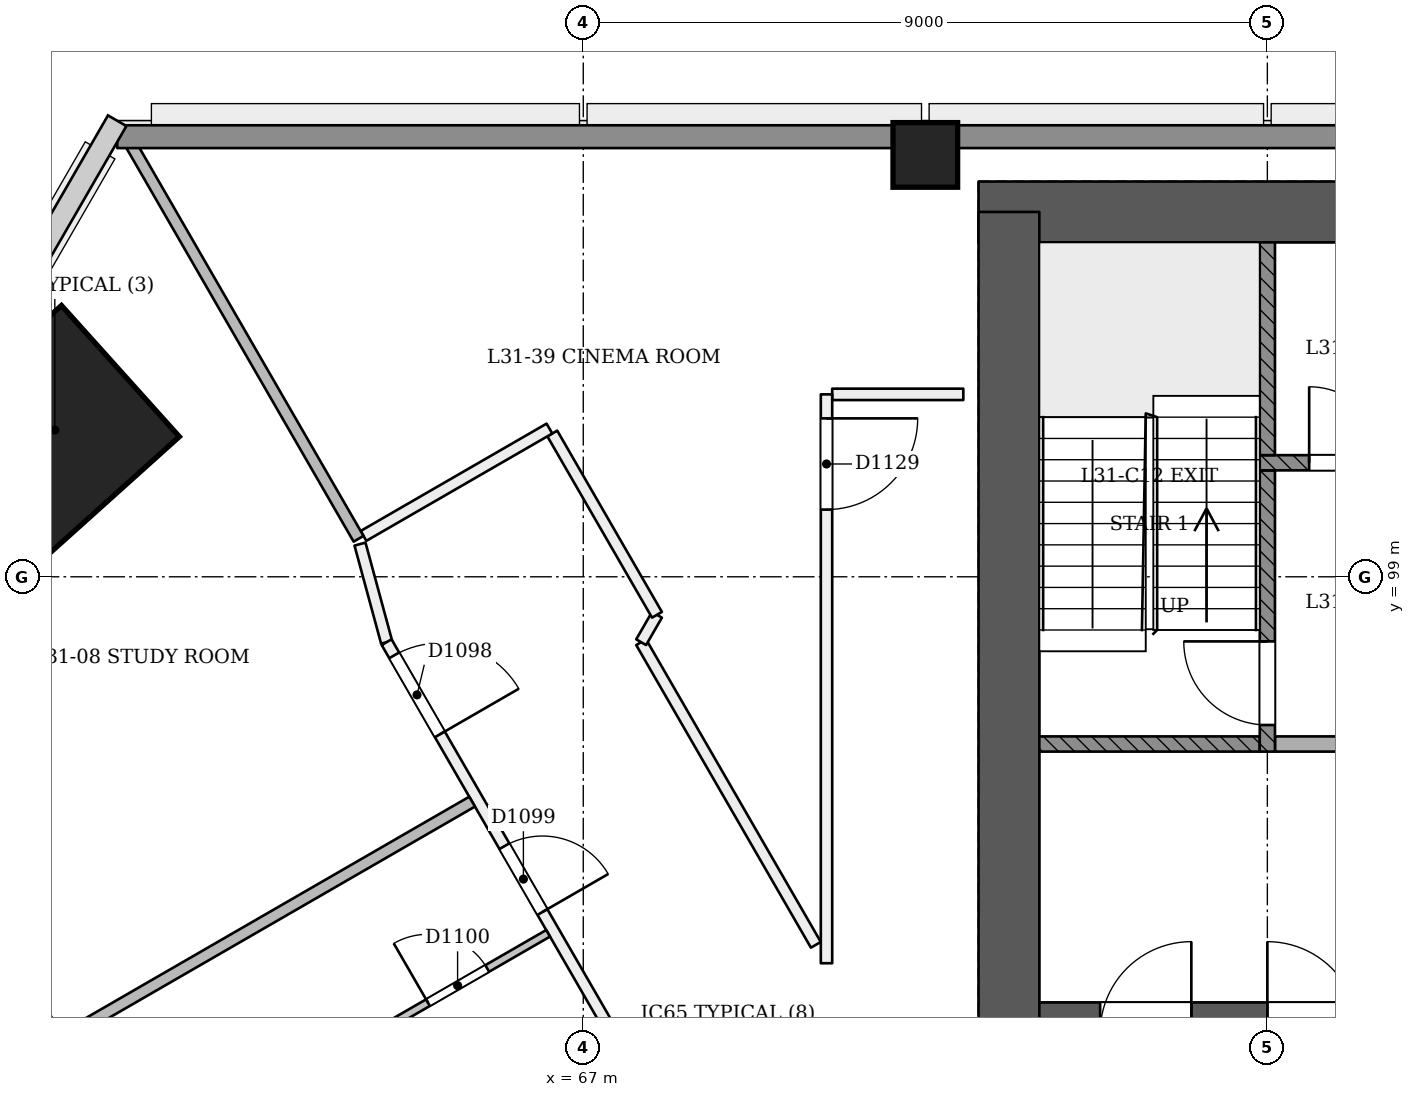
"""IFC4 building model, lengths in metres.
Left out: names, types, materials, properties, quantities, classifications, styles, units other than length and angle.
Written with IfcOpenShell. Run it as: python <this file> out.ifc"""

import sys

from ifc_helpers import new_model, si_unit, direction, frame, frame_2d, origin, origin_2d, place, context, subcontext, project, spatial, rectangle, extrude, element, fill, save


model = new_model("IFC4")
c1 = context("Model", 3, precision=1e-05, world=origin(), true_north=direction((0.0, 1.0)))
c2 = subcontext(c1, "Body", "Model", "MODEL_VIEW")
j1 = project(units=[si_unit("LENGTHUNIT", "METRE"), si_unit("PLANEANGLEUNIT", "RADIAN")], contexts=[c1])
p1 = place(None, origin())
s1 = spatial("IfcSite", under=j1, at=p1, CompositionType="ELEMENT")
p2 = place(p1, origin())
s2 = spatial("IfcBuilding", under=s1, at=p2, CompositionType="ELEMENT")
p3 = place(p2, frame((0.0, 0.0, 124.2)))
s3 = spatial("IfcBuildingStorey", under=s2, at=p3, CompositionType="ELEMENT", Elevation=124.2)
p4 = place(p3, frame((72.6, 93.0, 0.0), z_axis=(0.0, 0.0, 1.0), x_axis=(1.0, 0.0, 0.0)))
e1 = element("IfcWall", 1, at=p4, inside=s3, PredefinedType="SHEAR", context=c2, shape_type="SweptSolid", body=[
    extrude(rectangle(XDim=25.2, YDim=0.8, at=frame_2d((12.6, 0.0))), origin(), (0.0, 0.0, 1.0), 3.6),
])
p5 = place(p4, frame((1.2, 0.0, 0.0)))
e2 = element("IfcOpeningElement", 2, at=p5, cuts=e1, PredefinedType="OPENING", context=c2, shape_type="SweptSolid", body=[
    extrude(rectangle(XDim=1.2, YDim=2.1, at=frame_2d((0.6, 1.05))), frame((0.0, 0.411, 0.0), z_axis=(0.0, -1.0, 0.0), x_axis=(1.0, 0.0, 0.0)), (0.0, 0.0, 1.0), 0.821),
])
p6 = place(p4, frame((3.4, 0.0, 0.0)))
e3 = element("IfcOpeningElement", 3, at=p6, cuts=e1, PredefinedType="OPENING", context=c2, shape_type="SweptSolid", body=[
    extrude(rectangle(XDim=1.2, YDim=2.1, at=frame_2d((0.6, 1.05))), frame((0.0, 0.411, 0.0), z_axis=(0.0, -1.0, 0.0), x_axis=(1.0, 0.0, 0.0)), (0.0, 0.0, 1.0), 0.821),
])
p7 = place(p4, frame((13.4, 0.0, 0.0)))
e4 = element("IfcOpeningElement", 4, at=p7, cuts=e1, PredefinedType="OPENING", context=c2, shape_type="SweptSolid", body=[
    extrude(rectangle(XDim=1.2, YDim=2.1, at=frame_2d((0.6, 1.05))), frame((0.0, 0.411, 0.0), z_axis=(0.0, -1.0, 0.0), x_axis=(1.0, 0.0, 0.0)), (0.0, 0.0, 1.0), 0.821),
])
p8 = place(p4, frame((16.113, 0.0, 0.0)))
e5 = element("IfcOpeningElement", 5, at=p8, cuts=e1, PredefinedType="OPENING", context=c2, shape_type="SweptSolid", body=[
    extrude(rectangle(XDim=1.0, YDim=2.1, at=frame_2d((0.5, 1.05))), frame((0.0, 0.411, 0.0), z_axis=(0.0, -1.0, 0.0), x_axis=(1.0, 0.0, 0.0)), (0.0, 0.0, 1.0), 0.821),
])
p9 = place(p4, frame((20.0, 0.0, 0.0)))
e6 = element("IfcOpeningElement", 6, at=p9, cuts=e1, PredefinedType="OPENING", context=c2, shape_type="SweptSolid", body=[
    extrude(rectangle(XDim=1.0, YDim=2.1, at=frame_2d((0.5, 1.05))), frame((0.0, 0.411, 0.0), z_axis=(0.0, -1.0, 0.0), x_axis=(1.0, 0.0, 0.0)), (0.0, 0.0, 1.0), 0.821),
])
p10 = place(p4, frame((23.137, 0.0, 0.0)))
e7 = element("IfcOpeningElement", 7, at=p10, cuts=e1, PredefinedType="OPENING", context=c2, shape_type="SweptSolid", body=[
    extrude(rectangle(XDim=1.0, YDim=2.1, at=frame_2d((0.5, 1.05))), frame((0.0, 0.411, 0.0), z_axis=(0.0, -1.0, 0.0), x_axis=(1.0, 0.0, 0.0)), (0.0, 0.0, 1.0), 0.821),
])
p11 = place(p3, frame((97.4, 103.8, 0.0), z_axis=(0.0, 0.0, 1.0), x_axis=(-1.0, 0.0, 0.0)))
e8 = element("IfcWall", 8, at=p11, inside=s3, PredefinedType="SHEAR", context=c2, shape_type="SweptSolid", body=[
    extrude(rectangle(XDim=25.2, YDim=0.8, at=frame_2d((12.6, 0.0))), origin(), (0.0, 0.0, 1.0), 3.6),
])
p12 = place(p3, frame((72.6, 103.8, 0.0), z_axis=(0.0, 0.0, 1.0), x_axis=(0.0, -1.0, 0.0)))
e9 = element("IfcWall", 9, at=p12, inside=s3, PredefinedType="SHEAR", context=c2, shape_type="SweptSolid", body=[
    extrude(rectangle(XDim=11.2, YDim=0.8, at=frame_2d((5.6, 0.0))), origin(), (0.0, 0.0, 1.0), 3.6),
])
p13 = place(p3, frame((60.014, 100.92, 0.0), z_axis=(0.028334066552, 0.009286524205, 0.999555371723), x_axis=(-0.86655567717, 0.498682281887, 0.019930882981)))
e10 = element("IfcColumn", 10, at=p13, inside=s3, PredefinedType="COLUMN", context=c2, shape_type="SweptSolid", body=[
    extrude(rectangle(XDim=2.32, YDim=2.32, at=origin_2d()), origin(), (0.0, 0.0, 1.0), 3.602),
])
p14 = place(p3, frame((71.5, 104.55, 0.0), z_axis=(0.0, 0.0, 1.0), x_axis=(1.0, 0.0, 0.0)))
e11 = element("IfcColumn", 11, at=p14, inside=s3, PredefinedType="COLUMN", context=c2, shape_type="SweptSolid", body=[
    extrude(rectangle(XDim=0.85, YDim=0.85, at=origin_2d()), origin(), (0.0, 0.0, 1.0), 3.6),
])
p15 = place(p3, frame((64.062, 99.43, 0.0), z_axis=(0.0, 0.0, 1.0), x_axis=(0.261989498523, -0.965070724177, 0.0)))
e12 = element("IfcWall", 12, at=p15, inside=s3, PredefinedType="PARTITIONING", context=c2, shape_type="SweptSolid", body=[
    extrude(rectangle(XDim=1.337, YDim=0.15, at=frame_2d((0.668, 0.0))), origin(), (0.0, 0.0, 1.0), 3.15),
])
p16 = place(p3, frame((64.413, 98.139, 0.0), z_axis=(0.0, 0.0, 1.0), x_axis=(0.500003831119, -0.866023191876, 0.0)))
e13 = element("IfcWall", 13, at=p16, inside=s3, PredefinedType="PARTITIONING", context=c2, shape_type="SweptSolid", body=[
    extrude(rectangle(XDim=40.758, YDim=0.15, at=frame_2d((20.379, 0.0))), origin(), (0.0, 0.0, 1.0), 2.75),
])
p17 = place(p16, frame((0.2, 0.0, 0.0)))
e14 = element("IfcOpeningElement", 14, at=p17, cuts=e13, PredefinedType="OPENING", context=c2, shape_type="SweptSolid", body=[
    extrude(rectangle(XDim=1.2, YDim=2.1, at=frame_2d((0.6, 1.05))), frame((0.0, 0.085, 0.0), z_axis=(0.0, -1.0, 0.0), x_axis=(1.0, 0.0, 0.0)), (0.0, 0.0, 1.0), 0.171),
])
p18 = place(p16, frame((3.099, 0.0, 0.0)))
e15 = element("IfcOpeningElement", 15, at=p18, cuts=e13, PredefinedType="OPENING", context=c2, shape_type="SweptSolid", body=[
    extrude(rectangle(XDim=1.0, YDim=2.1, at=frame_2d((0.5, 1.05))), frame((0.0, 0.085, 0.0), z_axis=(0.0, -1.0, 0.0), x_axis=(1.0, 0.0, 0.0)), (0.0, 0.0, 1.0), 0.171),
])
p19 = place(p16, frame((9.774, 0.0, 0.0)))
e16 = element("IfcOpeningElement", 16, at=p19, cuts=e13, PredefinedType="OPENING", context=c2, shape_type="SweptSolid", body=[
    extrude(rectangle(XDim=1.0, YDim=2.1, at=frame_2d((0.5, 1.05))), frame((0.0, 0.085, 0.0), z_axis=(0.0, -1.0, 0.0), x_axis=(1.0, 0.0, 0.0)), (0.0, 0.0, 1.0), 0.171),
])
p20 = place(p16, frame((11.984, 0.0, 0.0)))
e17 = element("IfcOpeningElement", 17, at=p20, cuts=e13, PredefinedType="OPENING", context=c2, shape_type="SweptSolid", body=[
    extrude(rectangle(XDim=1.0, YDim=2.1, at=frame_2d((0.5, 1.05))), frame((0.0, 0.085, 0.0), z_axis=(0.0, -1.0, 0.0), x_axis=(1.0, 0.0, 0.0)), (0.0, 0.0, 1.0), 0.171),
])
p21 = place(p16, frame((18.659, 0.0, 0.0)))
e18 = element("IfcOpeningElement", 18, at=p21, cuts=e13, PredefinedType="OPENING", context=c2, shape_type="SweptSolid", body=[
    extrude(rectangle(XDim=1.0, YDim=2.1, at=frame_2d((0.5, 1.05))), frame((0.0, 0.085, 0.0), z_axis=(0.0, -1.0, 0.0), x_axis=(1.0, 0.0, 0.0)), (0.0, 0.0, 1.0), 0.171),
])
p22 = place(p16, frame((22.129, 0.0, 0.0)))
e19 = element("IfcOpeningElement", 19, at=p22, cuts=e13, PredefinedType="OPENING", context=c2, shape_type="SweptSolid", body=[
    extrude(rectangle(XDim=1.0, YDim=2.1, at=frame_2d((0.5, 1.05))), frame((0.0, 0.085, 0.0), z_axis=(0.0, -1.0, 0.0), x_axis=(1.0, 0.0, 0.0)), (0.0, 0.0, 1.0), 0.171),
])
p23 = place(p16, frame((27.659, 0.0, 0.0)))
e20 = element("IfcOpeningElement", 20, at=p23, cuts=e13, PredefinedType="OPENING", context=c2, shape_type="SweptSolid", body=[
    extrude(rectangle(XDim=1.0, YDim=2.1, at=frame_2d((0.5, 1.05))), frame((0.0, 0.085, 0.0), z_axis=(0.0, -1.0, 0.0), x_axis=(1.0, 0.0, 0.0)), (0.0, 0.0, 1.0), 0.171),
])
p24 = place(p16, frame((31.129, 0.0, 0.0)))
e21 = element("IfcOpeningElement", 21, at=p24, cuts=e13, PredefinedType="OPENING", context=c2, shape_type="SweptSolid", body=[
    extrude(rectangle(XDim=1.0, YDim=2.1, at=frame_2d((0.5, 1.05))), frame((0.0, 0.085, 0.0), z_axis=(0.0, -1.0, 0.0), x_axis=(1.0, 0.0, 0.0)), (0.0, 0.0, 1.0), 0.171),
])
p25 = place(p16, frame((36.659, 0.0, 0.0)))
e22 = element("IfcOpeningElement", 22, at=p25, cuts=e13, PredefinedType="OPENING", context=c2, shape_type="SweptSolid", body=[
    extrude(rectangle(XDim=1.0, YDim=2.1, at=frame_2d((0.5, 1.05))), frame((0.0, 0.085, 0.0), z_axis=(0.0, -1.0, 0.0), x_axis=(1.0, 0.0, 0.0)), (0.0, 0.0, 1.0), 0.171),
])
p26 = place(p16, frame((39.445, 0.0, 0.0)))
e23 = element("IfcOpeningElement", 23, at=p26, cuts=e13, PredefinedType="OPENING", context=c2, shape_type="SweptSolid", body=[
    extrude(rectangle(XDim=1.0, YDim=2.1, at=frame_2d((0.5, 1.05))), frame((0.0, 0.085, 0.0), z_axis=(0.0, -1.0, 0.0), x_axis=(1.0, 0.0, 0.0)), (0.0, 0.0, 1.0), 0.171),
])
p27 = place(p3, frame((72.0, 101.4, 0.0), z_axis=(0.0, 0.0, 1.0), x_axis=(-1.0, 0.0, 0.0)))
e24 = element("IfcWall", 24, at=p27, inside=s3, PredefinedType="PARTITIONING", context=c2, shape_type="SweptSolid", body=[
    extrude(rectangle(XDim=1.725, YDim=0.15, at=frame_2d((0.863, 0.0))), origin(), (0.0, 0.0, 1.0), 3.15),
])
p28 = place(p3, frame((70.2, 101.4, 0.0), z_axis=(0.0, 0.0, 1.0), x_axis=(0.0, -1.0, 0.0)))
e25 = element("IfcWall", 25, at=p28, inside=s3, PredefinedType="PARTITIONING", context=c2, shape_type="SweptSolid", body=[
    extrude(rectangle(XDim=7.484, YDim=0.15, at=frame_2d((3.742, 0.0))), origin(), (0.0, 0.0, 1.0), 3.15),
])
p29 = place(p28, frame((0.316, 0.0, 0.0)))
e26 = element("IfcOpeningElement", 26, at=p29, cuts=e25, PredefinedType="OPENING", context=c2, shape_type="SweptSolid", body=[
    extrude(rectangle(XDim=1.2, YDim=2.1, at=frame_2d((0.6, 1.05))), frame((0.0, 0.085, 0.0), z_axis=(0.0, -1.0, 0.0), x_axis=(1.0, 0.0, 0.0)), (0.0, 0.0, 1.0), 0.171),
])
p30 = place(p3, frame((70.06, 94.158, 0.0), z_axis=(0.0, 0.0, 1.0), x_axis=(-0.500005941123, 0.866021973648, 0.0)))
e27 = element("IfcWall", 27, at=p30, inside=s3, PredefinedType="PARTITIONING", context=c2, shape_type="SweptSolid", body=[
    extrude(rectangle(XDim=4.597, YDim=0.15, at=frame_2d((2.299, 0.0))), origin(), (0.0, 0.0, 1.0), 3.15),
])
p31 = place(p3, frame((67.761, 98.139, 0.0), z_axis=(0.0, 0.0, 1.0), x_axis=(0.49967168172, 0.866214875471, 0.0)))
e28 = element("IfcWall", 28, at=p31, inside=s3, PredefinedType="PARTITIONING", context=c2, shape_type="SweptSolid", body=[
    extrude(rectangle(XDim=0.416, YDim=0.15, at=frame_2d((0.208, 0.0))), origin(), (0.0, 0.0, 1.0), 3.15),
])
p32 = place(p3, frame((67.969, 98.5, 0.0), z_axis=(0.0, 0.0, 1.0), x_axis=(-0.499991038717, 0.866030577522, 0.0)))
e29 = element("IfcWall", 29, at=p32, inside=s3, PredefinedType="PARTITIONING", context=c2, shape_type="SweptSolid", body=[
    extrude(rectangle(XDim=2.754, YDim=0.15, at=frame_2d((1.377, 0.0))), origin(), (0.0, 0.0, 1.0), 3.15),
])
p33 = place(p3, frame((66.555, 100.95, 0.0), z_axis=(0.0, 0.0, 1.0), x_axis=(-0.866048868473, -0.499959355765, 0.0)))
e30 = element("IfcWall", 30, at=p33, inside=s3, PredefinedType="PARTITIONING", context=c2, shape_type="SweptSolid", body=[
    extrude(rectangle(XDim=2.825, YDim=0.15, at=frame_2d((1.413, 0.0))), origin(), (0.0, 0.0, 1.0), 3.15),
])
p34 = place(p3, frame((60.042, 92.869, 0.0), z_axis=(0.0, 0.0, 1.0), x_axis=(0.866025401434, 0.500000004071, 0.0)))
e31 = element("IfcWall", 31, at=p34, inside=s3, PredefinedType="PARTITIONING", context=c2, shape_type="SweptSolid", body=[
    extrude(rectangle(XDim=6.345, YDim=0.15, at=frame_2d((3.173, 0.0))), origin(), (0.0, 0.0, 1.0), 2.65),
])
p35 = place(p3, frame((64.044, 99.5, 0.0), z_axis=(0.0, 0.0, 1.0), x_axis=(-0.500004896655, 0.866022576681, 0.0)))
e32 = element("IfcWall", 32, at=p35, inside=s3, PredefinedType="PARTITIONING", context=c2, shape_type="SweptSolid", body=[
    extrude(rectangle(XDim=6.235, YDim=0.15, at=frame_2d((3.118, 0.0))), origin(), (0.0, 0.0, 1.0), 2.65),
])
p36 = place(p3, frame((64.091, 92.897, 0.0), z_axis=(0.0, 0.0, 1.0), x_axis=(0.866048868473, 0.499959355765, 0.0)))
e33 = element("IfcWall", 33, at=p36, inside=s3, PredefinedType="PARTITIONING", context=c2, shape_type="SweptSolid", body=[
    extrude(rectangle(XDim=2.825, YDim=0.1, at=frame_2d((1.413, 0.0))), origin(), (0.0, 0.0, 1.0), 3.15),
])
p37 = place(p36, frame((1.0, 0.0, 0.0)))
e34 = element("IfcOpeningElement", 34, at=p37, cuts=e33, PredefinedType="OPENING", context=c2, shape_type="SweptSolid", body=[
    extrude(rectangle(XDim=0.9, YDim=2.1, at=frame_2d((0.45, 1.05))), frame((0.0, 0.061, 0.0), z_axis=(0.0, -1.0, 0.0), x_axis=(1.0, 0.0, 0.0)), (0.0, 0.0, 1.0), 0.121),
])
p38 = place(p3, frame((60.868, 104.79, 0.0), z_axis=(0.0, 0.0, 1.0), x_axis=(1.0, 0.0, 0.0)))
e35 = element("IfcWall", 35, at=p38, inside=s3, PredefinedType="SOLIDWALL", context=c2, shape_type="SweptSolid", body=[
    extrude(rectangle(XDim=48.264, YDim=0.3, at=frame_2d((24.132, 0.0))), origin(), (0.0, 0.0, 1.0), 2.65),
])
p39 = place(p3, frame((73.0, 96.8, 0.0), z_axis=(0.0, 0.0, 1.0), x_axis=(1.0, 0.0, 0.0)))
e36 = element("IfcWall", 36, at=p39, inside=s3, PredefinedType="SOLIDWALL", context=c2, shape_type="SweptSolid", body=[
    extrude(rectangle(XDim=2.9, YDim=0.2, at=frame_2d((1.45, 0.0))), origin(), (0.0, 0.0, 1.0), 3.15),
])
p40 = place(p3, frame((76.0, 96.7, 0.0), z_axis=(0.0, 0.0, 1.0), x_axis=(0.0, 1.0, 0.0)))
e37 = element("IfcWall", 37, at=p40, inside=s3, PredefinedType="SOLIDWALL", context=c2, shape_type="SweptSolid", body=[
    extrude(rectangle(XDim=3.7, YDim=0.2, at=frame_2d((1.85, 0.0))), origin(), (0.0, 0.0, 1.0), 3.15),
])
p41 = place(p40, frame((0.35, 0.0, 0.0)))
e38 = element("IfcOpeningElement", 38, at=p41, cuts=e37, PredefinedType="OPENING", context=c2, shape_type="SweptSolid", body=[
    extrude(rectangle(XDim=1.1, YDim=2.1, at=frame_2d((0.55, 1.05))), frame((0.0, 0.11, 0.0), z_axis=(0.0, -1.0, 0.0), x_axis=(1.0, 0.0, 0.0)), (0.0, 0.0, 1.0), 0.221),
])
p42 = place(p3, frame((76.1, 96.8, 0.0), z_axis=(0.0, 0.0, 1.0), x_axis=(1.0, 0.0, 0.0)))
e39 = element("IfcWall", 39, at=p42, inside=s3, PredefinedType="PARTITIONING", context=c2, shape_type="SweptSolid", body=[
    extrude(rectangle(XDim=1.9, YDim=0.2, at=frame_2d((0.95, 0.0))), origin(), (0.0, 0.0, 1.0), 3.15),
])
p43 = place(p3, frame((75.9, 100.5, 0.0), z_axis=(0.0, 0.0, 1.0), x_axis=(1.0, 0.0, 0.0)))
e40 = element("IfcWall", 40, at=p43, inside=s3, PredefinedType="SOLIDWALL", context=c2, shape_type="SweptSolid", body=[
    extrude(rectangle(XDim=18.2, YDim=0.2, at=frame_2d((9.1, 0.0))), origin(), (0.0, 0.0, 1.0), 3.15),
])
p44 = place(p43, frame((2.6, 0.0, 0.0)))
e41 = element("IfcOpeningElement", 41, at=p44, cuts=e40, PredefinedType="OPENING", context=c2, shape_type="SweptSolid", body=[
    extrude(rectangle(XDim=1.1, YDim=2.1, at=frame_2d((0.55, 1.05))), frame((0.0, 0.11, 0.0), z_axis=(0.0, -1.0, 0.0), x_axis=(1.0, 0.0, 0.0)), (0.0, 0.0, 1.0), 0.221),
])
p45 = place(p43, frame((4.5, 0.0, 0.0)))
e42 = element("IfcOpeningElement", 42, at=p45, cuts=e40, PredefinedType="OPENING", context=c2, shape_type="SweptSolid", body=[
    extrude(rectangle(XDim=1.1, YDim=2.1, at=frame_2d((0.55, 1.05))), frame((0.0, 0.11, 0.0), z_axis=(0.0, -1.0, 0.0), x_axis=(1.0, 0.0, 0.0)), (0.0, 0.0, 1.0), 0.221),
])
p46 = place(p43, frame((6.4, 0.0, 0.0)))
e43 = element("IfcOpeningElement", 43, at=p46, cuts=e40, PredefinedType="OPENING", context=c2, shape_type="SweptSolid", body=[
    extrude(rectangle(XDim=1.1, YDim=2.1, at=frame_2d((0.55, 1.05))), frame((0.0, 0.11, 0.0), z_axis=(0.0, -1.0, 0.0), x_axis=(1.0, 0.0, 0.0)), (0.0, 0.0, 1.0), 0.221),
])
p47 = place(p43, frame((8.3, 0.0, 0.0)))
e44 = element("IfcOpeningElement", 44, at=p47, cuts=e40, PredefinedType="OPENING", context=c2, shape_type="SweptSolid", body=[
    extrude(rectangle(XDim=1.1, YDim=2.1, at=frame_2d((0.55, 1.05))), frame((0.0, 0.11, 0.0), z_axis=(0.0, -1.0, 0.0), x_axis=(1.0, 0.0, 0.0)), (0.0, 0.0, 1.0), 0.221),
])
p48 = place(p43, frame((10.2, 0.0, 0.0)))
e45 = element("IfcOpeningElement", 45, at=p48, cuts=e40, PredefinedType="OPENING", context=c2, shape_type="SweptSolid", body=[
    extrude(rectangle(XDim=1.1, YDim=2.1, at=frame_2d((0.55, 1.05))), frame((0.0, 0.11, 0.0), z_axis=(0.0, -1.0, 0.0), x_axis=(1.0, 0.0, 0.0)), (0.0, 0.0, 1.0), 0.221),
])
p49 = place(p43, frame((12.1, 0.0, 0.0)))
e46 = element("IfcOpeningElement", 46, at=p49, cuts=e40, PredefinedType="OPENING", context=c2, shape_type="SweptSolid", body=[
    extrude(rectangle(XDim=1.1, YDim=2.1, at=frame_2d((0.55, 1.05))), frame((0.0, 0.11, 0.0), z_axis=(0.0, -1.0, 0.0), x_axis=(1.0, 0.0, 0.0)), (0.0, 0.0, 1.0), 0.221),
])
p50 = place(p43, frame((14.0, 0.0, 0.0)))
e47 = element("IfcOpeningElement", 47, at=p50, cuts=e40, PredefinedType="OPENING", context=c2, shape_type="SweptSolid", body=[
    extrude(rectangle(XDim=1.1, YDim=2.1, at=frame_2d((0.55, 1.05))), frame((0.0, 0.11, 0.0), z_axis=(0.0, -1.0, 0.0), x_axis=(1.0, 0.0, 0.0)), (0.0, 0.0, 1.0), 0.221),
])
p51 = place(p43, frame((0.65, 0.0, 0.0)))
e48 = element("IfcOpeningElement", 48, at=p51, cuts=e40, PredefinedType="OPENING", context=c2, shape_type="SweptSolid", body=[
    extrude(rectangle(XDim=1.0, YDim=2.1, at=frame_2d((0.5, 1.05))), frame((0.0, 0.11, 0.0), z_axis=(0.0, -1.0, 0.0), x_axis=(1.0, 0.0, 0.0)), (0.0, 0.0, 1.0), 0.221),
])
p52 = place(p43, frame((16.3, 0.0, 0.0)))
e49 = element("IfcOpeningElement", 49, at=p52, cuts=e40, PredefinedType="OPENING", context=c2, shape_type="SweptSolid", body=[
    extrude(rectangle(XDim=1.0, YDim=2.1, at=frame_2d((0.5, 1.05))), frame((0.0, 0.11, 0.0), z_axis=(0.0, -1.0, 0.0), x_axis=(1.0, 0.0, 0.0)), (0.0, 0.0, 1.0), 0.221),
])
p53 = place(p3, frame((76.0, 100.6, 0.0), z_axis=(0.0, 0.0, 1.0), x_axis=(0.0, 1.0, 0.0)))
e50 = element("IfcWall", 50, at=p53, inside=s3, PredefinedType="SOLIDWALL", context=c2, shape_type="SweptSolid", body=[
    extrude(rectangle(XDim=2.8, YDim=0.2, at=frame_2d((1.4, 0.0))), origin(), (0.0, 0.0, 1.0), 3.15),
])
p54 = place(p17, origin())
e51 = element("IfcDoor", 51, at=p54, inside=s3, OperationType="SINGLE_SWING_RIGHT", PredefinedType="NOTDEFINED", context=c2, shape_type="SweptSolid", body=[
    extrude(rectangle(XDim=1.2, YDim=2.1, at=frame_2d((0.6, 1.05))), frame((0.0, 0.025, 0.0), z_axis=(0.0, -1.0, 0.0), x_axis=(1.0, 0.0, 0.0)), (0.0, 0.0, 1.0), 0.05),
])
fill(e14, e51)
p55 = place(p18, origin())
e52 = element("IfcDoor", 52, at=p55, inside=s3, OperationType="SINGLE_SWING_RIGHT", PredefinedType="NOTDEFINED", context=c2, shape_type="SweptSolid", body=[
    extrude(rectangle(XDim=1.0, YDim=2.1, at=frame_2d((0.5, 1.05))), frame((0.0, 0.025, 0.0), z_axis=(0.0, -1.0, 0.0), x_axis=(1.0, 0.0, 0.0)), (0.0, 0.0, 1.0), 0.05),
])
fill(e15, e52)
p56 = place(p37, origin())
e53 = element("IfcDoor", 53, at=p56, inside=s3, OperationType="SINGLE_SWING_LEFT", PredefinedType="NOTDEFINED", context=c2, shape_type="SweptSolid", body=[
    extrude(rectangle(XDim=0.9, YDim=2.1, at=frame_2d((0.45, 1.05))), frame((0.0, 0.025, 0.0), z_axis=(0.0, -1.0, 0.0), x_axis=(1.0, 0.0, 0.0)), (0.0, 0.0, 1.0), 0.05),
])
fill(e34, e53)
p57 = place(p29, origin())
e54 = element("IfcDoor", 54, at=p57, inside=s3, OperationType="SINGLE_SWING_LEFT", PredefinedType="NOTDEFINED", context=c2, shape_type="SweptSolid", body=[
    extrude(rectangle(XDim=1.2, YDim=2.1, at=frame_2d((0.6, 1.05))), frame((0.0, 0.025, 0.0), z_axis=(0.0, -1.0, 0.0), x_axis=(1.0, 0.0, 0.0)), (0.0, 0.0, 1.0), 0.05),
])
fill(e26, e54)
p58 = place(p41, origin())
e55 = element("IfcDoor", 55, at=p58, inside=s3, OperationType="SINGLE_SWING_RIGHT", PredefinedType="NOTDEFINED", context=c2, shape_type="SweptSolid", body=[
    extrude(rectangle(XDim=1.1, YDim=2.1, at=frame_2d((0.55, 1.05))), frame((0.0, 0.025, 0.0), z_axis=(0.0, -1.0, 0.0), x_axis=(1.0, 0.0, 0.0)), (0.0, 0.0, 1.0), 0.05),
])
fill(e38, e55)
p59 = place(p51, origin())
e56 = element("IfcDoor", 56, at=p59, inside=s3, OperationType="SINGLE_SWING_LEFT", PredefinedType="NOTDEFINED", context=c2, shape_type="SweptSolid", body=[
    extrude(rectangle(XDim=1.0, YDim=2.1, at=frame_2d((0.5, 1.05))), frame((0.0, 0.025, 0.0), z_axis=(0.0, -1.0, 0.0), x_axis=(1.0, 0.0, 0.0)), (0.0, 0.0, 1.0), 0.05),
])
fill(e48, e56)
save(model, sys.argv[1])
